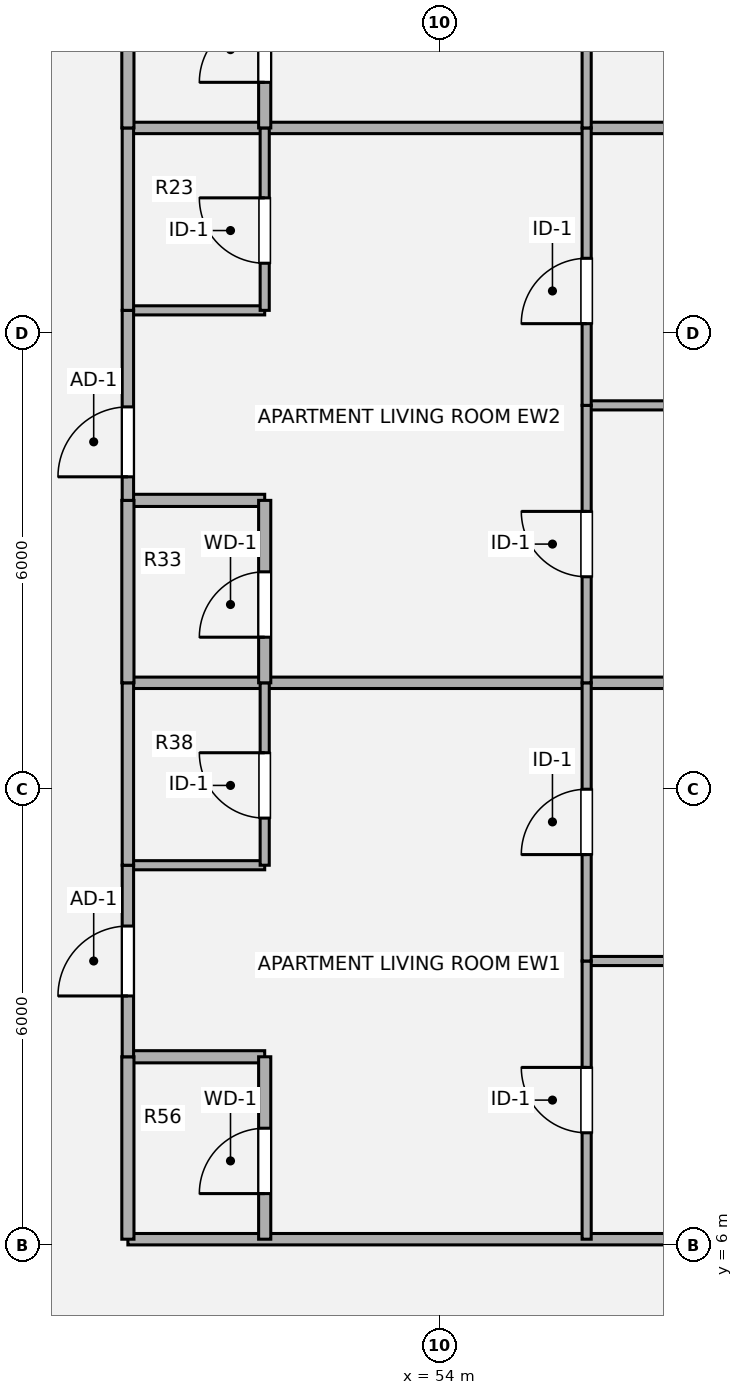
"""IFC4 building model, lengths in metres.
Left out: names, types, materials, properties, quantities, classifications, styles, units other than length and angle.
Written with IfcOpenShell. Run it as: python <this file> out.ifc"""

import sys

from ifc_helpers import new_model, si_unit, direction, frame, frame_2d, origin, origin_2d, place, context, subcontext, project, spatial, rectangle, extrude, source, transform, mapped, element, fill, save


model = new_model("IFC4")
c1 = context("Model", 3, precision=1e-05, world=origin(), true_north=direction((0.0, 1.0)))
c2 = subcontext(c1, "Body", "Model", "MODEL_VIEW")
j1 = project(units=[si_unit("LENGTHUNIT", "METRE"), si_unit("PLANEANGLEUNIT", "RADIAN")], contexts=[c1])
p1 = place(None, origin())
s1 = spatial("IfcSite", under=j1, at=p1, CompositionType="ELEMENT")
p2 = place(p1, origin())
s2 = spatial("IfcBuilding", under=s1, at=p2, CompositionType="ELEMENT")
p3 = place(p2, frame((0.0, 0.0, 30.78)))
s3 = spatial("IfcBuildingStorey", under=s2, at=p3, CompositionType="ELEMENT", Elevation=30.78)
p4 = place(p3, frame((49.9, 6.08, 0.0), z_axis=(0.0, 0.0, 1.0), x_axis=(1.0, 0.0, 0.0)))
e1 = element("IfcWall", 1, at=p4, inside=s3, PredefinedType="PARTITIONING", context=c2, shape_type="SweptSolid", body=[
    extrude(rectangle(XDim=10.02, YDim=0.15, at=frame_2d((5.01, 0.0))), origin(), (0.0, 0.0, 1.0), 3.5),
])
p5 = place(p3, frame((49.9, 8.48, 0.0), z_axis=(0.0, 0.0, 1.0), x_axis=(1.0, 0.0, 0.0)))
e2 = element("IfcWall", 2, at=p5, inside=s3, PredefinedType="PLUMBINGWALL", context=c2, shape_type="SweptSolid", body=[
    extrude(rectangle(XDim=1.8, YDim=0.16, at=frame_2d((0.9, 0.0))), origin(), (0.0, 0.0, 1.0), 3.5),
])
p6 = place(p3, frame((55.936, 9.74, 0.0), z_axis=(0.0, 0.0, 1.0), x_axis=(1.0, 0.0, 0.0)))
e3 = element("IfcWall", 3, at=p6, inside=s3, PredefinedType="PARTITIONING", context=c2, shape_type="SweptSolid", body=[
    extrude(rectangle(XDim=3.984, YDim=0.12, at=frame_2d((1.992, 0.0))), origin(), (0.0, 0.0, 1.0), 3.5),
])
p7 = place(p3, frame((49.9, 11.0, 0.0), z_axis=(0.0, 0.0, 1.0), x_axis=(1.0, 0.0, 0.0)))
e4 = element("IfcWall", 4, at=p7, inside=s3, PredefinedType="PARTITIONING", context=c2, shape_type="SweptSolid", body=[
    extrude(rectangle(XDim=1.8, YDim=0.12, at=frame_2d((0.9, 0.0))), origin(), (0.0, 0.0, 1.0), 3.5),
])
p8 = place(p3, frame((49.9, 13.4, 0.0), z_axis=(0.0, 0.0, 1.0), x_axis=(1.0, 0.0, 0.0)))
e5 = element("IfcWall", 5, at=p8, inside=s3, PredefinedType="PARTITIONING", context=c2, shape_type="SweptSolid", body=[
    extrude(rectangle(XDim=10.02, YDim=0.15, at=frame_2d((5.01, 0.0))), origin(), (0.0, 0.0, 1.0), 3.5),
])
p9 = place(p3, frame((49.9, 15.8, 0.0), z_axis=(0.0, 0.0, 1.0), x_axis=(1.0, 0.0, 0.0)))
e6 = element("IfcWall", 6, at=p9, inside=s3, PredefinedType="PLUMBINGWALL", context=c2, shape_type="SweptSolid", body=[
    extrude(rectangle(XDim=1.8, YDim=0.16, at=frame_2d((0.9, 0.0))), origin(), (0.0, 0.0, 1.0), 3.5),
])
p10 = place(p3, frame((55.936, 17.05, 0.0), z_axis=(0.0, 0.0, 1.0), x_axis=(1.0, 0.0, 0.0)))
e7 = element("IfcWall", 7, at=p10, inside=s3, PredefinedType="PARTITIONING", context=c2, shape_type="SweptSolid", body=[
    extrude(rectangle(XDim=3.984, YDim=0.12, at=frame_2d((1.992, 0.0))), origin(), (0.0, 0.0, 1.0), 3.5),
])
p11 = place(p3, frame((49.9, 18.3, 0.0), z_axis=(0.0, 0.0, 1.0), x_axis=(1.0, 0.0, 0.0)))
e8 = element("IfcWall", 8, at=p11, inside=s3, PredefinedType="PARTITIONING", context=c2, shape_type="SweptSolid", body=[
    extrude(rectangle(XDim=1.8, YDim=0.12, at=frame_2d((0.9, 0.0))), origin(), (0.0, 0.0, 1.0), 2.715),
])
p12 = place(p3, frame((49.9, 20.7, 0.0), z_axis=(0.0, 0.0, 1.0), x_axis=(1.0, 0.0, 0.0)))
e9 = element("IfcWall", 9, at=p12, inside=s3, PredefinedType="PARTITIONING", context=c2, shape_type="SweptSolid", body=[
    extrude(rectangle(XDim=10.02, YDim=0.15, at=frame_2d((5.01, 0.0))), origin(), (0.0, 0.0, 1.0), 2.982),
])
p13 = place(p3, frame((49.9, 6.08, 0.0), z_axis=(0.0, 0.0, 1.0), x_axis=(0.0, 1.0, 0.0)))
e10 = element("IfcWall", 10, at=p13, inside=s3, PredefinedType="PLUMBINGWALL", context=c2, shape_type="SweptSolid", body=[
    extrude(rectangle(XDim=2.4, YDim=0.16, at=frame_2d((1.2, 0.0))), origin(), (0.0, 0.0, 1.0), 3.5),
])
p14 = place(p3, frame((49.9, 8.48, 0.0), z_axis=(0.0, 0.0, 1.0), x_axis=(0.0, 1.0, 0.0)))
e11 = element("IfcWall", 11, at=p14, inside=s3, PredefinedType="PARTITIONING", context=c2, shape_type="SweptSolid", body=[
    extrude(rectangle(XDim=2.52, YDim=0.15, at=frame_2d((1.26, 0.0))), origin(), (0.0, 0.0, 1.0), 3.5),
])
p15 = place(p14, frame((0.8, 0.0, 0.0)))
e12 = element("IfcOpeningElement", 12, at=p15, cuts=e11, PredefinedType="OPENING", context=c2, shape_type="SweptSolid", body=[
    extrude(rectangle(XDim=0.92, YDim=2.1, at=origin_2d()), frame((0.46, 0.085, 1.05), z_axis=(0.0, -1.0, 0.0), x_axis=(1.0, 0.0, 0.0)), (0.0, 0.0, 1.0), 0.17),
])
p16 = place(p3, frame((49.9, 11.0, 0.0), z_axis=(0.0, 0.0, 1.0), x_axis=(0.0, 1.0, 0.0)))
e13 = element("IfcWall", 13, at=p16, inside=s3, PredefinedType="PARTITIONING", context=c2, shape_type="SweptSolid", body=[
    extrude(rectangle(XDim=2.4, YDim=0.15, at=frame_2d((1.2, 0.0))), origin(), (0.0, 0.0, 1.0), 3.5),
])
p17 = place(p3, frame((49.9, 13.4, 0.0), z_axis=(0.0, 0.0, 1.0), x_axis=(0.0, 1.0, 0.0)))
e14 = element("IfcWall", 14, at=p17, inside=s3, PredefinedType="PLUMBINGWALL", context=c2, shape_type="SweptSolid", body=[
    extrude(rectangle(XDim=2.4, YDim=0.16, at=frame_2d((1.2, 0.0))), origin(), (0.0, 0.0, 1.0), 3.5),
])
p18 = place(p3, frame((49.9, 15.8, 0.0), z_axis=(0.0, 0.0, 1.0), x_axis=(0.0, 1.0, 0.0)))
e15 = element("IfcWall", 15, at=p18, inside=s3, PredefinedType="PARTITIONING", context=c2, shape_type="SweptSolid", body=[
    extrude(rectangle(XDim=2.5, YDim=0.15, at=frame_2d((1.25, 0.0))), origin(), (0.0, 0.0, 1.0), 3.5),
])
p19 = place(p18, frame((0.31, 0.0, 0.0)))
e16 = element("IfcOpeningElement", 16, at=p19, cuts=e15, PredefinedType="OPENING", context=c2, shape_type="SweptSolid", body=[
    extrude(rectangle(XDim=0.92, YDim=2.1, at=origin_2d()), frame((0.46, 0.085, 1.05), z_axis=(0.0, -1.0, 0.0), x_axis=(1.0, 0.0, 0.0)), (0.0, 0.0, 1.0), 0.17),
])
p20 = place(p3, frame((49.9, 18.3, 0.0), z_axis=(0.0, 0.0, 1.0), x_axis=(0.0, 1.0, 0.0)))
e17 = element("IfcWall", 17, at=p20, inside=s3, PredefinedType="PARTITIONING", context=c2, shape_type="SweptSolid", body=[
    extrude(rectangle(XDim=2.4, YDim=0.15, at=frame_2d((1.2, 0.0))), origin(), (0.0, 0.0, 1.0), 3.5),
])
p21 = place(p3, frame((49.9, 20.7, 0.0), z_axis=(0.0, 0.0, 1.0), x_axis=(0.0, 1.0, 0.0)))
e18 = element("IfcWall", 18, at=p21, inside=s3, PredefinedType="PLUMBINGWALL", context=c2, shape_type="SweptSolid", body=[
    extrude(rectangle(XDim=2.4, YDim=0.16, at=frame_2d((1.2, 0.0))), origin(), (0.0, 0.0, 1.0), 3.5),
])
p22 = place(p3, frame((51.7, 6.08, 0.0), z_axis=(0.0, 0.0, 1.0), x_axis=(0.0, 1.0, 0.0)))
e19 = element("IfcWall", 19, at=p22, inside=s3, PredefinedType="PLUMBINGWALL", context=c2, shape_type="SweptSolid", body=[
    extrude(rectangle(XDim=2.4, YDim=0.16, at=frame_2d((1.2, 0.0))), origin(), (0.0, 0.0, 1.0), 3.5),
])
p23 = place(p22, frame((0.6, 0.0, 0.0)))
e20 = element("IfcOpeningElement", 20, at=p23, cuts=e19, PredefinedType="OPENING", context=c2, shape_type="SweptSolid", body=[
    extrude(rectangle(XDim=0.86, YDim=2.1, at=origin_2d()), frame((0.43, 0.09, 1.05), z_axis=(0.0, -1.0, 0.0), x_axis=(1.0, 0.0, 0.0)), (0.0, 0.0, 1.0), 0.18),
])
p24 = place(p3, frame((51.7, 11.0, 0.0), z_axis=(0.0, 0.0, 1.0), x_axis=(0.0, 1.0, 0.0)))
e21 = element("IfcWall", 21, at=p24, inside=s3, PredefinedType="PARTITIONING", context=c2, shape_type="SweptSolid", body=[
    extrude(rectangle(XDim=2.4, YDim=0.12, at=frame_2d((1.2, 0.0))), origin(), (0.0, 0.0, 1.0), 3.5),
])
p25 = place(p24, frame((0.62, 0.0, 0.0)))
e22 = element("IfcOpeningElement", 22, at=p25, cuts=e21, PredefinedType="OPENING", context=c2, shape_type="SweptSolid", body=[
    extrude(rectangle(XDim=0.86, YDim=2.1, at=origin_2d()), frame((0.43, 0.07, 1.05), z_axis=(0.0, -1.0, 0.0), x_axis=(1.0, 0.0, 0.0)), (0.0, 0.0, 1.0), 0.14),
])
p26 = place(p3, frame((51.7, 13.4, 0.0), z_axis=(0.0, 0.0, 1.0), x_axis=(0.0, 1.0, 0.0)))
e23 = element("IfcWall", 23, at=p26, inside=s3, PredefinedType="PLUMBINGWALL", context=c2, shape_type="SweptSolid", body=[
    extrude(rectangle(XDim=2.4, YDim=0.16, at=frame_2d((1.2, 0.0))), origin(), (0.0, 0.0, 1.0), 3.5),
])
p27 = place(p26, frame((0.6, 0.0, 0.0)))
e24 = element("IfcOpeningElement", 24, at=p27, cuts=e23, PredefinedType="OPENING", context=c2, shape_type="SweptSolid", body=[
    extrude(rectangle(XDim=0.86, YDim=2.1, at=origin_2d()), frame((0.43, 0.09, 1.05), z_axis=(0.0, -1.0, 0.0), x_axis=(1.0, 0.0, 0.0)), (0.0, 0.0, 1.0), 0.18),
])
p28 = place(p3, frame((51.7, 18.3, 0.0), z_axis=(0.0, 0.0, 1.0), x_axis=(0.0, 1.0, 0.0)))
e25 = element("IfcWall", 25, at=p28, inside=s3, PredefinedType="PARTITIONING", context=c2, shape_type="SweptSolid", body=[
    extrude(rectangle(XDim=2.4, YDim=0.12, at=frame_2d((1.2, 0.0))), origin(), (0.0, 0.0, 1.0), 3.5),
])
p29 = place(p28, frame((0.62, 0.0, 0.0)))
e26 = element("IfcOpeningElement", 26, at=p29, cuts=e25, PredefinedType="OPENING", context=c2, shape_type="SweptSolid", body=[
    extrude(rectangle(XDim=0.86, YDim=2.1, at=origin_2d()), frame((0.43, 0.07, 1.05), z_axis=(0.0, -1.0, 0.0), x_axis=(1.0, 0.0, 0.0)), (0.0, 0.0, 1.0), 0.14),
])
p30 = place(p3, frame((51.7, 20.7, 0.0), z_axis=(0.0, 0.0, 1.0), x_axis=(0.0, 1.0, 0.0)))
e27 = element("IfcWall", 27, at=p30, inside=s3, PredefinedType="PLUMBINGWALL", context=c2, shape_type="SweptSolid", body=[
    extrude(rectangle(XDim=2.4, YDim=0.16, at=frame_2d((1.2, 0.0))), origin(), (0.0, 0.0, 1.0), 3.5),
])
p31 = place(p30, frame((0.6, 0.0, 0.0)))
e28 = element("IfcOpeningElement", 28, at=p31, cuts=e27, PredefinedType="OPENING", context=c2, shape_type="SweptSolid", body=[
    extrude(rectangle(XDim=0.86, YDim=2.1, at=origin_2d()), frame((0.43, 0.09, 1.05), z_axis=(0.0, -1.0, 0.0), x_axis=(1.0, 0.0, 0.0)), (0.0, 0.0, 1.0), 0.18),
])
p32 = place(p3, frame((55.936, 6.08, 0.0), z_axis=(0.0, 0.0, 1.0), x_axis=(0.0, 1.0, 0.0)))
e29 = element("IfcWall", 29, at=p32, inside=s3, PredefinedType="PARTITIONING", context=c2, shape_type="SweptSolid", body=[
    extrude(rectangle(XDim=3.66, YDim=0.12, at=frame_2d((1.83, 0.0))), origin(), (0.0, 0.0, 1.0), 3.5),
])
p33 = place(p32, frame((1.4, 0.0, 0.0)))
e30 = element("IfcOpeningElement", 30, at=p33, cuts=e29, PredefinedType="OPENING", context=c2, shape_type="SweptSolid", body=[
    extrude(rectangle(XDim=0.86, YDim=2.1, at=origin_2d()), frame((0.43, 0.07, 1.05), z_axis=(0.0, -1.0, 0.0), x_axis=(1.0, 0.0, 0.0)), (0.0, 0.0, 1.0), 0.14),
])
p34 = place(p3, frame((55.936, 9.74, 0.0), z_axis=(0.0, 0.0, 1.0), x_axis=(0.0, 1.0, 0.0)))
e31 = element("IfcWall", 31, at=p34, inside=s3, PredefinedType="PARTITIONING", context=c2, shape_type="SweptSolid", body=[
    extrude(rectangle(XDim=3.66, YDim=0.12, at=frame_2d((1.83, 0.0))), origin(), (0.0, 0.0, 1.0), 3.5),
])
p35 = place(p34, frame((1.4, 0.0, 0.0)))
e32 = element("IfcOpeningElement", 32, at=p35, cuts=e31, PredefinedType="OPENING", context=c2, shape_type="SweptSolid", body=[
    extrude(rectangle(XDim=0.86, YDim=2.1, at=origin_2d()), frame((0.43, 0.07, 1.05), z_axis=(0.0, -1.0, 0.0), x_axis=(1.0, 0.0, 0.0)), (0.0, 0.0, 1.0), 0.14),
])
p36 = place(p3, frame((55.936, 13.4, 0.0), z_axis=(0.0, 0.0, 1.0), x_axis=(0.0, 1.0, 0.0)))
e33 = element("IfcWall", 33, at=p36, inside=s3, PredefinedType="PARTITIONING", context=c2, shape_type="SweptSolid", body=[
    extrude(rectangle(XDim=3.65, YDim=0.12, at=frame_2d((1.825, 0.0))), origin(), (0.0, 0.0, 1.0), 3.5),
])
p37 = place(p36, frame((1.395, 0.0, 0.0)))
e34 = element("IfcOpeningElement", 34, at=p37, cuts=e33, PredefinedType="OPENING", context=c2, shape_type="SweptSolid", body=[
    extrude(rectangle(XDim=0.86, YDim=2.1, at=origin_2d()), frame((0.43, 0.07, 1.05), z_axis=(0.0, -1.0, 0.0), x_axis=(1.0, 0.0, 0.0)), (0.0, 0.0, 1.0), 0.14),
])
p38 = place(p3, frame((55.936, 17.05, 0.0), z_axis=(0.0, 0.0, 1.0), x_axis=(0.0, 1.0, 0.0)))
e35 = element("IfcWall", 35, at=p38, inside=s3, PredefinedType="PARTITIONING", context=c2, shape_type="SweptSolid", body=[
    extrude(rectangle(XDim=3.65, YDim=0.12, at=frame_2d((1.825, 0.0))), origin(), (0.0, 0.0, 1.0), 3.5),
])
p39 = place(p38, frame((1.075, 0.0, 0.0)))
e36 = element("IfcOpeningElement", 36, at=p39, cuts=e35, PredefinedType="OPENING", context=c2, shape_type="SweptSolid", body=[
    extrude(rectangle(XDim=0.86, YDim=2.1, at=origin_2d()), frame((0.43, 0.07, 1.05), z_axis=(0.0, -1.0, 0.0), x_axis=(1.0, 0.0, 0.0)), (0.0, 0.0, 1.0), 0.14),
])
p40 = place(p3, frame((55.936, 20.7, 0.0), z_axis=(0.0, 0.0, 1.0), x_axis=(0.0, 1.0, 0.0)))
e37 = element("IfcWall", 37, at=p40, inside=s3, PredefinedType="PARTITIONING", context=c2, shape_type="SweptSolid", body=[
    extrude(rectangle(XDim=3.7, YDim=0.12, at=frame_2d((1.85, 0.0))), origin(), (0.0, 0.0, 1.0), 3.5),
])
p41 = place(p40, frame((1.42, 0.0, 0.0)))
e38 = element("IfcOpeningElement", 38, at=p41, cuts=e37, PredefinedType="OPENING", context=c2, shape_type="SweptSolid", body=[
    extrude(rectangle(XDim=0.86, YDim=2.1, at=origin_2d()), frame((0.43, 0.07, 1.05), z_axis=(0.0, -1.0, 0.0), x_axis=(1.0, 0.0, 0.0)), (0.0, 0.0, 1.0), 0.14),
])
m1 = source(origin(), c2, "Body", "SweptSolid", [
    extrude(rectangle(XDim=0.92, YDim=2.1, at=origin_2d()), frame((0.46, 0.025, 1.05), z_axis=(0.0, -1.0, 0.0), x_axis=(1.0, 0.0, 0.0)), (0.0, 0.0, 1.0), 0.05),
])
p42 = place(p15, origin())
e39 = element("IfcDoor", 39, at=p42, inside=s3, OperationType="SINGLE_SWING_LEFT", PredefinedType="DOOR", context=c2, shape_type="MappedRepresentation", body=[
    mapped(m1, transform((0.0, 0.0, 0.0), x_axis=(1.0, 0.0, 0.0), y_axis=(0.0, 1.0, 0.0), z_axis=(0.0, 0.0, 1.0), scale=1.0)),
])
fill(e12, e39)
p43 = place(p19, origin())
e40 = element("IfcDoor", 40, at=p43, inside=s3, OperationType="SINGLE_SWING_LEFT", PredefinedType="DOOR", context=c2, shape_type="MappedRepresentation", body=[
    mapped(m1, transform((0.0, 0.0, 0.0), x_axis=(1.0, 0.0, 0.0), y_axis=(0.0, 1.0, 0.0), z_axis=(0.0, 0.0, 1.0), scale=1.0)),
])
fill(e16, e40)
m2 = source(origin(), c2, "Body", "SweptSolid", [
    extrude(rectangle(XDim=0.86, YDim=2.1, at=origin_2d()), frame((0.43, 0.025, 1.05), z_axis=(0.0, -1.0, 0.0), x_axis=(1.0, 0.0, 0.0)), (0.0, 0.0, 1.0), 0.05),
])
p44 = place(p23, origin())
e41 = element("IfcDoor", 41, at=p44, inside=s3, OperationType="SINGLE_SWING_LEFT", PredefinedType="DOOR", context=c2, shape_type="MappedRepresentation", body=[
    mapped(m2, transform((0.0, 0.0, 0.0), x_axis=(1.0, 0.0, 0.0), y_axis=(0.0, 1.0, 0.0), z_axis=(0.0, 0.0, 1.0), scale=1.0)),
])
fill(e20, e41)
m3 = source(origin(), c2, "Body", "SweptSolid", [
    extrude(rectangle(XDim=0.86, YDim=2.1, at=origin_2d()), frame((0.43, 0.025, 1.05), z_axis=(0.0, -1.0, 0.0), x_axis=(1.0, 0.0, 0.0)), (0.0, 0.0, 1.0), 0.05),
])
p45 = place(p25, origin())
e42 = element("IfcDoor", 42, at=p45, inside=s3, OperationType="SINGLE_SWING_RIGHT", PredefinedType="DOOR", context=c2, shape_type="MappedRepresentation", body=[
    mapped(m3, transform((0.0, 0.0, 0.0), x_axis=(1.0, 0.0, 0.0), y_axis=(0.0, 1.0, 0.0), z_axis=(0.0, 0.0, 1.0), scale=1.0)),
])
fill(e22, e42)
p46 = place(p27, origin())
e43 = element("IfcDoor", 43, at=p46, inside=s3, OperationType="SINGLE_SWING_LEFT", PredefinedType="DOOR", context=c2, shape_type="MappedRepresentation", body=[
    mapped(m2, transform((0.0, 0.0, 0.0), x_axis=(1.0, 0.0, 0.0), y_axis=(0.0, 1.0, 0.0), z_axis=(0.0, 0.0, 1.0), scale=1.0)),
])
fill(e24, e43)
p47 = place(p29, origin())
e44 = element("IfcDoor", 44, at=p47, inside=s3, OperationType="SINGLE_SWING_RIGHT", PredefinedType="DOOR", context=c2, shape_type="MappedRepresentation", body=[
    mapped(m3, transform((0.0, 0.0, 0.0), x_axis=(1.0, 0.0, 0.0), y_axis=(0.0, 1.0, 0.0), z_axis=(0.0, 0.0, 1.0), scale=1.0)),
])
fill(e26, e44)
p48 = place(p31, origin())
e45 = element("IfcDoor", 45, at=p48, inside=s3, OperationType="SINGLE_SWING_LEFT", PredefinedType="DOOR", context=c2, shape_type="MappedRepresentation", body=[
    mapped(m2, transform((0.0, 0.0, 0.0), x_axis=(1.0, 0.0, 0.0), y_axis=(0.0, 1.0, 0.0), z_axis=(0.0, 0.0, 1.0), scale=1.0)),
])
fill(e28, e45)
p49 = place(p33, origin())
e46 = element("IfcDoor", 46, at=p49, inside=s3, OperationType="SINGLE_SWING_RIGHT", PredefinedType="DOOR", context=c2, shape_type="MappedRepresentation", body=[
    mapped(m3, transform((0.0, 0.0, 0.0), x_axis=(1.0, 0.0, 0.0), y_axis=(0.0, 1.0, 0.0), z_axis=(0.0, 0.0, 1.0), scale=1.0)),
])
fill(e30, e46)
p50 = place(p35, origin())
e47 = element("IfcDoor", 47, at=p50, inside=s3, OperationType="SINGLE_SWING_LEFT", PredefinedType="DOOR", context=c2, shape_type="MappedRepresentation", body=[
    mapped(m3, transform((0.0, 0.0, 0.0), x_axis=(1.0, 0.0, 0.0), y_axis=(0.0, 1.0, 0.0), z_axis=(0.0, 0.0, 1.0), scale=1.0)),
])
fill(e32, e47)
p51 = place(p37, origin())
e48 = element("IfcDoor", 48, at=p51, inside=s3, OperationType="SINGLE_SWING_RIGHT", PredefinedType="DOOR", context=c2, shape_type="MappedRepresentation", body=[
    mapped(m3, transform((0.0, 0.0, 0.0), x_axis=(1.0, 0.0, 0.0), y_axis=(0.0, 1.0, 0.0), z_axis=(0.0, 0.0, 1.0), scale=1.0)),
])
fill(e34, e48)
p52 = place(p39, origin())
e49 = element("IfcDoor", 49, at=p52, inside=s3, OperationType="SINGLE_SWING_LEFT", PredefinedType="DOOR", context=c2, shape_type="MappedRepresentation", body=[
    mapped(m3, transform((0.0, 0.0, 0.0), x_axis=(1.0, 0.0, 0.0), y_axis=(0.0, 1.0, 0.0), z_axis=(0.0, 0.0, 1.0), scale=1.0)),
])
fill(e36, e49)
save(model, sys.argv[1])
